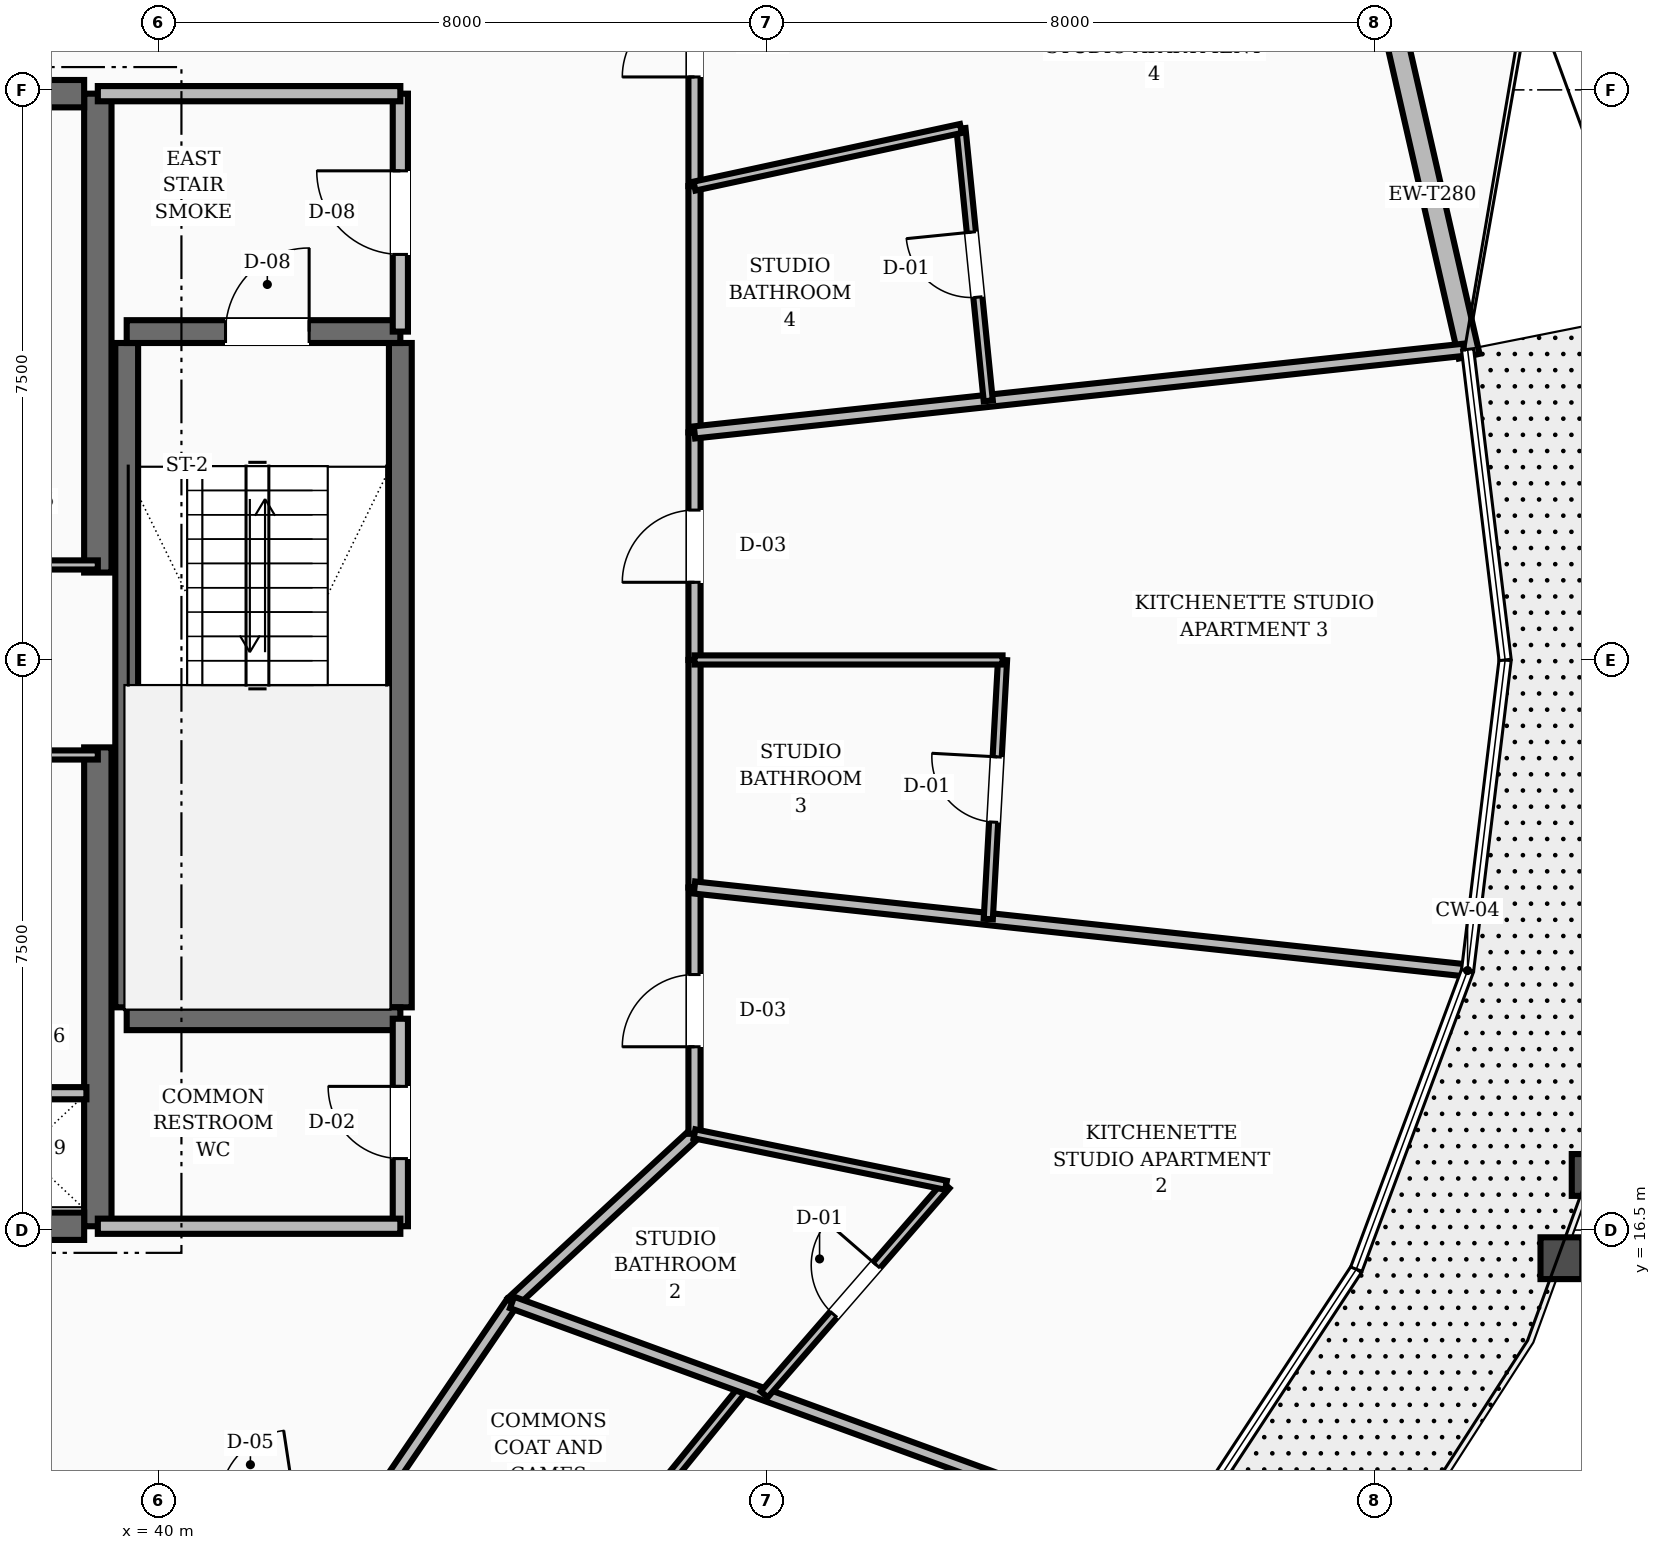
"""IFC4 building model, lengths in metres.
Left out: names, types, materials, properties, quantities, classifications, styles, units other than length and angle.
Written with IfcOpenShell. Run it as: python <this file> out.ifc"""

import sys

from ifc_helpers import new_model, si_unit, direction, frame, frame_2d, origin, place, context, subcontext, project, spatial, rectangle, extrude, element, fill, save


model = new_model("IFC4")
c1 = context("Model", 3, precision=1e-05, world=origin(), true_north=direction((0.0, 1.0)))
c2 = subcontext(c1, "Body", "Model", "MODEL_VIEW")
j1 = project(units=[si_unit("LENGTHUNIT", "METRE"), si_unit("PLANEANGLEUNIT", "RADIAN")], contexts=[c1])
p1 = place(None, origin())
s1 = spatial("IfcSite", under=j1, at=p1, CompositionType="ELEMENT")
p2 = place(p1, origin())
s2 = spatial("IfcBuilding", under=s1, at=p2, CompositionType="ELEMENT")
p3 = place(p2, frame((0.0, 0.0, 156.8)))
s3 = spatial("IfcBuildingStorey", under=s2, at=p3, CompositionType="ELEMENT", Elevation=156.8)
for number, where, z_axis, x_axis in (
    (1, (39.2, 16.55, 0.0), (0.0, 0.0, 1.0), (0.0, 1.0, 0.0)),
    (2, (39.2, 25.15, 0.0), (0.0, 0.0, 1.0), (0.0, 1.0, 0.0)),
):
    element("IfcWall", number, at=place(p3, frame(where, z_axis=z_axis, x_axis=x_axis)), inside=s3, PredefinedType="SHEAR", context=c2, shape_type="SweptSolid", body=[
        extrude(rectangle(XDim=6.3, YDim=0.36, at=frame_2d((3.15, 0.0))), origin(), (0.0, 0.0, 1.0), 3.6),
    ])
p4 = place(p3, frame((35.8, 16.55, 0.0), z_axis=(0.0, 0.0, 1.0), x_axis=(1.0, 0.0, 0.0)))
e3 = element("IfcWall", 3, at=p4, inside=s3, PredefinedType="SHEAR", context=c2, shape_type="SweptSolid", body=[
    extrude(rectangle(XDim=3.22, YDim=0.36, at=frame_2d((1.61, 0.0))), origin(), (0.0, 0.0, 1.0), 3.6),
])
p5 = place(p4, frame((0.3, 0.0, 0.0)))
e4 = element("IfcOpeningElement", 4, at=p5, cuts=e3, PredefinedType="OPENING", context=c2, shape_type="SweptSolid", body=[
    extrude(rectangle(XDim=1.1, YDim=2.1, at=frame_2d((0.55, 1.05))), frame((0.0, 0.19, 0.0), z_axis=(0.0, -1.0, 0.0), x_axis=(1.0, 0.0, 0.0)), (0.0, 0.0, 1.0), 0.38),
])
p6 = place(p3, frame((35.8, 31.45, 0.0), z_axis=(0.0, 0.0, 1.0), x_axis=(1.0, 0.0, 0.0)))
e5 = element("IfcWall", 5, at=p6, inside=s3, PredefinedType="SHEAR", context=c2, shape_type="SweptSolid", body=[
    extrude(rectangle(XDim=3.22, YDim=0.36, at=frame_2d((1.61, 0.0))), origin(), (0.0, 0.0, 1.0), 3.6),
])
p7 = place(p6, frame((0.3, 0.0, 0.0)))
e6 = element("IfcOpeningElement", 6, at=p7, cuts=e5, PredefinedType="OPENING", context=c2, shape_type="SweptSolid", body=[
    extrude(rectangle(XDim=1.1, YDim=2.1, at=frame_2d((0.55, 1.05))), frame((0.0, 0.19, 0.0), z_axis=(0.0, -1.0, 0.0), x_axis=(1.0, 0.0, 0.0)), (0.0, 0.0, 1.0), 0.38),
])
for number, where, z_axis, x_axis in (
    (7, (43.18, 19.43, 0.0), (0.0, 0.0, 1.0), (0.0, 1.0, 0.0)),
    (8, (39.58, 19.43, 0.0), (0.0, 0.0, 1.0), (0.0, 1.0, 0.0)),
):
    element("IfcWall", number, at=place(p3, frame(where, z_axis=z_axis, x_axis=x_axis)), inside=s3, PredefinedType="SHEAR", context=c2, shape_type="SweptSolid", body=[
        extrude(rectangle(XDim=8.74, YDim=0.3, at=frame_2d((4.37, 0.0))), origin(), (0.0, 0.0, 1.0), 3.6),
    ])
p8 = place(p3, frame((39.58, 19.28, 0.0), z_axis=(0.0, 0.0, 1.0), x_axis=(1.0, 0.0, 0.0)))
e9 = element("IfcWall", 9, at=p8, inside=s3, PredefinedType="SHEAR", context=c2, shape_type="SweptSolid", body=[
    extrude(rectangle(XDim=3.6, YDim=0.3, at=frame_2d((1.8, 0.0))), origin(), (0.0, 0.0, 1.0), 3.6),
])
p9 = place(p3, frame((39.58, 28.32, 0.0), z_axis=(0.0, 0.0, 1.0), x_axis=(1.0, 0.0, 0.0)))
e10 = element("IfcWall", 10, at=p9, inside=s3, PredefinedType="SHEAR", context=c2, shape_type="SweptSolid", body=[
    extrude(rectangle(XDim=3.6, YDim=0.3, at=frame_2d((1.8, 0.0))), origin(), (0.0, 0.0, 1.0), 3.6),
])
p10 = place(p9, frame((1.3, 0.0, 0.0)))
e11 = element("IfcOpeningElement", 11, at=p10, cuts=e10, PredefinedType="OPENING", context=c2, shape_type="SweptSolid", body=[
    extrude(rectangle(XDim=1.1, YDim=2.1, at=frame_2d((0.55, 1.05))), frame((0.0, 0.16, 0.0), z_axis=(0.0, -1.0, 0.0), x_axis=(1.0, 0.0, 0.0)), (0.0, 0.0, 1.0), 0.32),
])
p11 = place(p3, frame((57.241, 27.996, 0.0), z_axis=(0.0, 0.0, 1.0), x_axis=(-0.222546928421, 0.97492197875, 0.0)))
e12 = element("IfcWall", 12, at=p11, inside=s3, PredefinedType="STANDARD", context=c2, shape_type="SweptSolid", body=[
    extrude(rectangle(XDim=4.342, YDim=0.28, at=frame_2d((2.171, 0.0))), origin(), (0.0, 0.0, 1.0), 2.82),
])
p12 = place(p3, frame((43.18, 28.32, 0.0), z_axis=(0.0, 0.0, 1.0), x_axis=(0.0, 1.0, 0.0)))
e13 = element("IfcWall", 13, at=p12, inside=s3, PredefinedType="SOLIDWALL", context=c2, shape_type="SweptSolid", body=[
    extrude(rectangle(XDim=3.13, YDim=0.2, at=frame_2d((1.565, 0.0))), origin(), (0.0, 0.0, 1.0), 2.8),
])
p13 = place(p12, frame((1.015, 0.0, 0.0)))
e14 = element("IfcOpeningElement", 14, at=p13, cuts=e13, PredefinedType="OPENING", context=c2, shape_type="SweptSolid", body=[
    extrude(rectangle(XDim=1.1, YDim=2.1, at=frame_2d((0.55, 1.05))), frame((0.0, 0.11, 0.0), z_axis=(0.0, -1.0, 0.0), x_axis=(1.0, 0.0, 0.0)), (0.0, 0.0, 1.0), 0.22),
])
p14 = place(p3, frame((39.2, 31.45, 0.0), z_axis=(0.0, 0.0, 1.0), x_axis=(1.0, 0.0, 0.0)))
e15 = element("IfcWall", 15, at=p14, inside=s3, PredefinedType="SOLIDWALL", context=c2, shape_type="SweptSolid", body=[
    extrude(rectangle(XDim=3.98, YDim=0.2, at=frame_2d((1.99, 0.0))), origin(), (0.0, 0.0, 1.0), 2.8),
])
p15 = place(p3, frame((43.18, 16.55, 0.0), z_axis=(0.0, 0.0, 1.0), x_axis=(0.0, 1.0, 0.0)))
e16 = element("IfcWall", 16, at=p15, inside=s3, PredefinedType="SOLIDWALL", context=c2, shape_type="SweptSolid", body=[
    extrude(rectangle(XDim=2.73, YDim=0.2, at=frame_2d((1.365, 0.0))), origin(), (0.0, 0.0, 1.0), 2.8),
])
p16 = place(p15, frame((0.89, 0.0, 0.0)))
e17 = element("IfcOpeningElement", 17, at=p16, cuts=e16, PredefinedType="OPENING", context=c2, shape_type="SweptSolid", body=[
    extrude(rectangle(XDim=0.95, YDim=2.1, at=frame_2d((0.475, 1.05))), frame((0.0, 0.11, 0.0), z_axis=(0.0, -1.0, 0.0), x_axis=(1.0, 0.0, 0.0)), (0.0, 0.0, 1.0), 0.22),
])
p17 = place(p3, frame((39.2, 16.55, 0.0), z_axis=(0.0, 0.0, 1.0), x_axis=(1.0, 0.0, 0.0)))
e18 = element("IfcWall", 18, at=p17, inside=s3, PredefinedType="SOLIDWALL", context=c2, shape_type="SweptSolid", body=[
    extrude(rectangle(XDim=3.98, YDim=0.2, at=frame_2d((1.99, 0.0))), origin(), (0.0, 0.0, 1.0), 2.8),
])
p18 = place(p3, frame((37.4, 18.3, 0.0), z_axis=(0.0, 0.0, 1.0), x_axis=(1.0, 0.0, 0.0)))
e19 = element("IfcWall", 19, at=p18, inside=s3, PredefinedType="SOLIDWALL", context=c2, shape_type="SweptSolid", body=[
    extrude(rectangle(XDim=1.65, YDim=0.16, at=frame_2d((0.825, 0.0))), origin(), (0.0, 0.0, 1.0), 2.8),
])
for number, where, z_axis, x_axis in (
    (20, (37.4, 25.25, 0.0), (0.0, 0.0, 1.0), (1.0, 0.0, 0.0)),
    (21, (37.4, 22.75, 0.0), (0.0, 0.0, 1.0), (1.0, 0.0, 0.0)),
):
    element("IfcWall", number, at=place(p3, frame(where, z_axis=z_axis, x_axis=x_axis)), inside=s3, PredefinedType="PARTITIONING", context=c2, shape_type="SweptSolid", body=[
        extrude(rectangle(XDim=1.8, YDim=0.12, at=frame_2d((0.9, 0.0))), origin(), (0.0, 0.0, 1.0), 2.8),
    ])
p19 = place(p3, frame((47.05, 24.0, 0.0), z_axis=(0.0, 0.0, 1.0), x_axis=(0.0, 1.0, 0.0)))
e22 = element("IfcWall", 22, at=p19, inside=s3, PredefinedType="SOLIDWALL", context=c2, shape_type="SweptSolid", body=[
    extrude(rectangle(XDim=2.994, YDim=0.16, at=frame_2d((1.497, 0.0))), origin(), (0.0, 0.0, 1.0), 2.8),
])
p20 = place(p19, frame((1.022, 0.0, 0.0)))
e23 = element("IfcOpeningElement", 23, at=p20, cuts=e22, PredefinedType="OPENING", context=c2, shape_type="SweptSolid", body=[
    extrude(rectangle(XDim=0.95, YDim=2.1, at=frame_2d((0.475, 1.05))), frame((0.0, 0.09, 0.0), z_axis=(0.0, -1.0, 0.0), x_axis=(1.0, 0.0, 0.0)), (0.0, 0.0, 1.0), 0.18),
])
p21 = place(p3, frame((47.05, 26.994, 0.0), z_axis=(0.0, 0.0, 1.0), x_axis=(0.0, 1.0, 0.0)))
e24 = element("IfcWall", 24, at=p21, inside=s3, PredefinedType="SOLIDWALL", context=c2, shape_type="SweptSolid", body=[
    extrude(rectangle(XDim=3.24, YDim=0.16, at=frame_2d((1.62, 0.0))), origin(), (0.0, 0.0, 1.0), 2.8),
])
p22 = place(p3, frame((47.05, 30.234, 0.0), z_axis=(0.0, 0.0, 1.0), x_axis=(0.0, 1.0, 0.0)))
e25 = element("IfcWall", 25, at=p22, inside=s3, PredefinedType="SOLIDWALL", context=c2, shape_type="SweptSolid", body=[
    extrude(rectangle(XDim=3.822, YDim=0.16, at=frame_2d((1.911, 0.0))), origin(), (0.0, 0.0, 1.0), 2.8),
])
p23 = place(p22, frame((1.436, 0.0, 0.0)))
e26 = element("IfcOpeningElement", 26, at=p23, cuts=e25, PredefinedType="OPENING", context=c2, shape_type="SweptSolid", body=[
    extrude(rectangle(XDim=0.95, YDim=2.1, at=frame_2d((0.475, 1.05))), frame((0.0, 0.09, 0.0), z_axis=(0.0, -1.0, 0.0), x_axis=(1.0, 0.0, 0.0)), (0.0, 0.0, 1.0), 0.18),
])
p24 = place(p3, frame((42.95, 13.05, 0.0), z_axis=(0.0, 0.0, 1.0), x_axis=(0.562674669208, 0.826678423955, 0.0)))
e27 = element("IfcWall", 27, at=p24, inside=s3, PredefinedType="SOLIDWALL", context=c2, shape_type="SweptSolid", body=[
    extrude(rectangle(XDim=3.021, YDim=0.16, at=frame_2d((1.511, 0.0))), origin(), (0.0, 0.0, 1.0), 2.8),
])
p25 = place(p3, frame((44.65, 15.548, 0.0), z_axis=(0.0, 0.0, 1.0), x_axis=(0.734347936521, 0.678773237633, 0.0)))
e28 = element("IfcWall", 28, at=p25, inside=s3, PredefinedType="SOLIDWALL", context=c2, shape_type="SweptSolid", body=[
    extrude(rectangle(XDim=3.268, YDim=0.16, at=frame_2d((1.634, 0.0))), origin(), (0.0, 0.0, 1.0), 2.8),
])
p26 = place(p3, frame((47.05, 17.766, 0.0), z_axis=(0.0, 0.0, 1.0), x_axis=(0.0, 1.0, 0.0)))
e29 = element("IfcWall", 29, at=p26, inside=s3, PredefinedType="SOLIDWALL", context=c2, shape_type="SweptSolid", body=[
    extrude(rectangle(XDim=3.24, YDim=0.16, at=frame_2d((1.62, 0.0))), origin(), (0.0, 0.0, 1.0), 2.8),
])
p27 = place(p26, frame((1.145, 0.0, 0.0)))
e30 = element("IfcOpeningElement", 30, at=p27, cuts=e29, PredefinedType="OPENING", context=c2, shape_type="SweptSolid", body=[
    extrude(rectangle(XDim=0.95, YDim=2.1, at=frame_2d((0.475, 1.05))), frame((0.0, 0.09, 0.0), z_axis=(0.0, -1.0, 0.0), x_axis=(1.0, 0.0, 0.0)), (0.0, 0.0, 1.0), 0.18),
])
p28 = place(p3, frame((47.05, 21.006, 0.0), z_axis=(0.0, 0.0, 1.0), x_axis=(0.0, 1.0, 0.0)))
e31 = element("IfcWall", 31, at=p28, inside=s3, PredefinedType="SOLIDWALL", context=c2, shape_type="SweptSolid", body=[
    extrude(rectangle(XDim=2.994, YDim=0.16, at=frame_2d((1.497, 0.0))), origin(), (0.0, 0.0, 1.0), 2.8),
])
p29 = place(p3, frame((45.482, 11.699, 0.0), z_axis=(0.0, 0.0, 1.0), x_axis=(0.631043665678, 0.775747311957, 0.0)))
e32 = element("IfcWall", 32, at=p29, inside=s3, PredefinedType="PARTITIONING", context=c2, shape_type="SweptSolid", body=[
    extrude(rectangle(XDim=3.524, YDim=0.12, at=frame_2d((1.762, 0.0))), origin(), (0.0, 0.0, 1.0), 2.8),
])
p30 = place(p3, frame((44.65, 15.548, 0.0), z_axis=(0.0, 0.0, 1.0), x_axis=(0.939495403678, -0.342561507568, 0.0)))
e33 = element("IfcWall", 33, at=p30, inside=s3, PredefinedType="SOLIDWALL", context=c2, shape_type="SweptSolid", body=[
    extrude(rectangle(XDim=9.244, YDim=0.16, at=frame_2d((4.622, 0.0))), origin(), (0.0, 0.0, 1.0), 2.8),
])
p31 = place(p3, frame((47.968, 14.338, 0.0), z_axis=(0.0, 0.0, 1.0), x_axis=(0.655911700686, 0.754837625522, 0.0)))
e34 = element("IfcWall", 34, at=p31, inside=s3, PredefinedType="PARTITIONING", context=c2, shape_type="SweptSolid", body=[
    extrude(rectangle(XDim=3.645, YDim=0.12, at=frame_2d((1.823, 0.0))), origin(), (0.0, 0.0, 1.0), 2.8),
])
p32 = place(p31, frame((1.393, 0.0, 0.0)))
e35 = element("IfcOpeningElement", 35, at=p32, cuts=e34, PredefinedType="OPENING", context=c2, shape_type="SweptSolid", body=[
    extrude(rectangle(XDim=0.86, YDim=2.1, at=frame_2d((0.43, 1.05))), frame((0.0, 0.07, 0.0), z_axis=(0.0, -1.0, 0.0), x_axis=(1.0, 0.0, 0.0)), (0.0, 0.0, 1.0), 0.14),
])
p33 = place(p3, frame((47.05, 17.766, 0.0), z_axis=(0.0, 0.0, 1.0), x_axis=(0.979703641508, -0.200451427573, 0.0)))
e36 = element("IfcWall", 36, at=p33, inside=s3, PredefinedType="PARTITIONING", context=c2, shape_type="SweptSolid", body=[
    extrude(rectangle(XDim=3.377, YDim=0.12, at=frame_2d((1.689, 0.0))), origin(), (0.0, 0.0, 1.0), 2.8),
])
p34 = place(p3, frame((47.05, 21.006, 0.0), z_axis=(0.0, 0.0, 1.0), x_axis=(0.994280445997, -0.106800724287, 0.0)))
e37 = element("IfcWall", 37, at=p34, inside=s3, PredefinedType="SOLIDWALL", context=c2, shape_type="SweptSolid", body=[
    extrude(rectangle(XDim=10.179, YDim=0.16, at=frame_2d((5.09, 0.0))), origin(), (0.0, 0.0, 1.0), 2.8),
])
p35 = place(p3, frame((50.915, 20.591, 0.0), z_axis=(0.0, 0.0, 1.0), x_axis=(0.055066014274, 0.998482715961, 0.0)))
e38 = element("IfcWall", 38, at=p35, inside=s3, PredefinedType="PARTITIONING", context=c2, shape_type="SweptSolid", body=[
    extrude(rectangle(XDim=3.414, YDim=0.12, at=frame_2d((1.707, 0.0))), origin(), (0.0, 0.0, 1.0), 2.8),
])
p36 = place(p35, frame((1.277, 0.0, 0.0)))
e39 = element("IfcOpeningElement", 39, at=p36, cuts=e38, PredefinedType="OPENING", context=c2, shape_type="SweptSolid", body=[
    extrude(rectangle(XDim=0.86, YDim=2.1, at=frame_2d((0.43, 1.05))), frame((0.0, 0.07, 0.0), z_axis=(0.0, -1.0, 0.0), x_axis=(1.0, 0.0, 0.0)), (0.0, 0.0, 1.0), 0.14),
])
p37 = place(p3, frame((47.05, 24.0, 0.0), z_axis=(0.0, 0.0, 1.0), x_axis=(1.0, 0.0, 0.0)))
e40 = element("IfcWall", 40, at=p37, inside=s3, PredefinedType="PARTITIONING", context=c2, shape_type="SweptSolid", body=[
    extrude(rectangle(XDim=4.053, YDim=0.12, at=frame_2d((2.026, 0.0))), origin(), (0.0, 0.0, 1.0), 2.8),
])
p38 = place(p3, frame((47.05, 26.994, 0.0), z_axis=(0.0, 0.0, 1.0), x_axis=(0.994280445997, 0.106800724287, 0.0)))
e41 = element("IfcWall", 41, at=p38, inside=s3, PredefinedType="SOLIDWALL", context=c2, shape_type="SweptSolid", body=[
    extrude(rectangle(XDim=10.179, YDim=0.16, at=frame_2d((5.09, 0.0))), origin(), (0.0, 0.0, 1.0), 2.8),
])
p39 = place(p3, frame((50.915, 27.409, 0.0), z_axis=(0.0, 0.0, 1.0), x_axis=(-0.099785610451, 0.995008960737, 0.0)))
e42 = element("IfcWall", 42, at=p39, inside=s3, PredefinedType="PARTITIONING", context=c2, shape_type="SweptSolid", body=[
    extrude(rectangle(XDim=3.602, YDim=0.12, at=frame_2d((1.801, 0.0))), origin(), (0.0, 0.0, 1.0), 2.8),
])
p40 = place(p39, frame((1.371, 0.0, 0.0)))
e43 = element("IfcOpeningElement", 43, at=p40, cuts=e42, PredefinedType="OPENING", context=c2, shape_type="SweptSolid", body=[
    extrude(rectangle(XDim=0.86, YDim=2.1, at=frame_2d((0.43, 1.05))), frame((0.0, 0.07, 0.0), z_axis=(0.0, -1.0, 0.0), x_axis=(1.0, 0.0, 0.0)), (0.0, 0.0, 1.0), 0.14),
])
p41 = place(p3, frame((47.05, 30.234, 0.0), z_axis=(0.0, 0.0, 1.0), x_axis=(0.977392118343, 0.211434734613, 0.0)))
e44 = element("IfcWall", 44, at=p41, inside=s3, PredefinedType="PARTITIONING", context=c2, shape_type="SweptSolid", body=[
    extrude(rectangle(XDim=3.586, YDim=0.12, at=frame_2d((1.793, 0.0))), origin(), (0.0, 0.0, 1.0), 2.8),
])
p42 = place(p10, origin())
e45 = element("IfcDoor", 45, at=p42, inside=s3, OperationType="SINGLE_SWING_RIGHT", PredefinedType="DOOR", context=c2, shape_type="SweptSolid", body=[
    extrude(rectangle(XDim=1.1, YDim=2.1, at=frame_2d((0.55, 1.05))), frame((0.0, 0.025, 0.0), z_axis=(0.0, -1.0, 0.0), x_axis=(1.0, 0.0, 0.0)), (0.0, 0.0, 1.0), 0.05),
])
fill(e11, e45)
p43 = place(p13, origin())
e46 = element("IfcDoor", 46, at=p43, inside=s3, OperationType="SINGLE_SWING_RIGHT", PredefinedType="DOOR", context=c2, shape_type="SweptSolid", body=[
    extrude(rectangle(XDim=1.1, YDim=2.1, at=frame_2d((0.55, 1.05))), frame((0.0, 0.025, 0.0), z_axis=(0.0, -1.0, 0.0), x_axis=(1.0, 0.0, 0.0)), (0.0, 0.0, 1.0), 0.05),
])
fill(e14, e46)
p44 = place(p16, origin())
e47 = element("IfcDoor", 47, at=p44, inside=s3, OperationType="SINGLE_SWING_RIGHT", PredefinedType="DOOR", context=c2, shape_type="SweptSolid", body=[
    extrude(rectangle(XDim=0.95, YDim=2.1, at=frame_2d((0.475, 1.05))), frame((0.0, 0.025, 0.0), z_axis=(0.0, -1.0, 0.0), x_axis=(1.0, 0.0, 0.0)), (0.0, 0.0, 1.0), 0.05),
])
fill(e17, e47)
p45 = place(p32, origin())
e48 = element("IfcDoor", 48, at=p45, inside=s3, OperationType="SINGLE_SWING_RIGHT", PredefinedType="DOOR", context=c2, shape_type="SweptSolid", body=[
    extrude(rectangle(XDim=0.86, YDim=2.1, at=frame_2d((0.43, 1.05))), frame((0.0, 0.025, 0.0), z_axis=(0.0, -1.0, 0.0), x_axis=(1.0, 0.0, 0.0)), (0.0, 0.0, 1.0), 0.05),
])
fill(e35, e48)
p46 = place(p27, origin())
e49 = element("IfcDoor", 49, at=p46, inside=s3, OperationType="SINGLE_SWING_LEFT", PredefinedType="DOOR", context=c2, shape_type="SweptSolid", body=[
    extrude(rectangle(XDim=0.95, YDim=2.1, at=frame_2d((0.475, 1.05))), frame((0.0, 0.025, 0.0), z_axis=(0.0, -1.0, 0.0), x_axis=(1.0, 0.0, 0.0)), (0.0, 0.0, 1.0), 0.05),
])
fill(e30, e49)
p47 = place(p36, origin())
e50 = element("IfcDoor", 50, at=p47, inside=s3, OperationType="SINGLE_SWING_RIGHT", PredefinedType="DOOR", context=c2, shape_type="SweptSolid", body=[
    extrude(rectangle(XDim=0.86, YDim=2.1, at=frame_2d((0.43, 1.05))), frame((0.0, 0.025, 0.0), z_axis=(0.0, -1.0, 0.0), x_axis=(1.0, 0.0, 0.0)), (0.0, 0.0, 1.0), 0.05),
])
fill(e39, e50)
p48 = place(p20, origin())
e51 = element("IfcDoor", 51, at=p48, inside=s3, OperationType="SINGLE_SWING_LEFT", PredefinedType="DOOR", context=c2, shape_type="SweptSolid", body=[
    extrude(rectangle(XDim=0.95, YDim=2.1, at=frame_2d((0.475, 1.05))), frame((0.0, 0.025, 0.0), z_axis=(0.0, -1.0, 0.0), x_axis=(1.0, 0.0, 0.0)), (0.0, 0.0, 1.0), 0.05),
])
fill(e23, e51)
p49 = place(p40, origin())
e52 = element("IfcDoor", 52, at=p49, inside=s3, OperationType="SINGLE_SWING_RIGHT", PredefinedType="DOOR", context=c2, shape_type="SweptSolid", body=[
    extrude(rectangle(XDim=0.86, YDim=2.1, at=frame_2d((0.43, 1.05))), frame((0.0, 0.025, 0.0), z_axis=(0.0, -1.0, 0.0), x_axis=(1.0, 0.0, 0.0)), (0.0, 0.0, 1.0), 0.05),
])
fill(e43, e52)
p50 = place(p23, origin())
e53 = element("IfcDoor", 53, at=p50, inside=s3, OperationType="SINGLE_SWING_LEFT", PredefinedType="DOOR", context=c2, shape_type="SweptSolid", body=[
    extrude(rectangle(XDim=0.95, YDim=2.1, at=frame_2d((0.475, 1.05))), frame((0.0, 0.025, 0.0), z_axis=(0.0, -1.0, 0.0), x_axis=(1.0, 0.0, 0.0)), (0.0, 0.0, 1.0), 0.05),
])
fill(e26, e53)
save(model, sys.argv[1])
